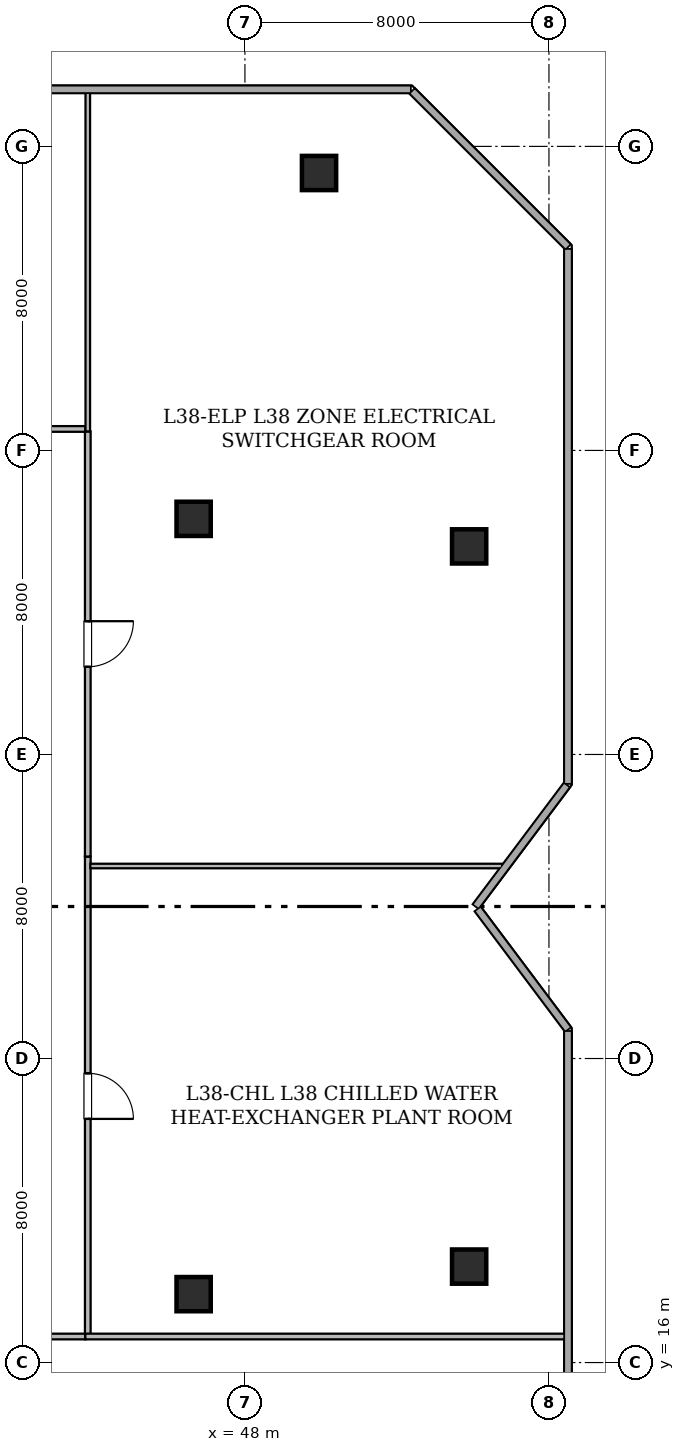
"""IFC4 building model, lengths in metres.
Left out: names, types, materials, properties, quantities, classifications, styles, units other than length and angle.
Written with IfcOpenShell. Run it as: python <this file> out.ifc"""

import sys

from ifc_helpers import new_model, si_unit, direction, frame, frame_2d, origin, origin_2d, place, context, subcontext, project, spatial, rectangle, hollow_rectangle, extrude, element, fill, save


model = new_model("IFC4")
c1 = context("Model", 3, precision=1e-05, world=origin(), true_north=direction((0.0, 1.0)))
c2 = subcontext(c1, "Body", "Model", "MODEL_VIEW")
j1 = project(units=[si_unit("LENGTHUNIT", "METRE"), si_unit("PLANEANGLEUNIT", "RADIAN")], contexts=[c1])
p1 = place(None, origin())
s1 = spatial("IfcSite", under=j1, at=p1, CompositionType="ELEMENT")
p2 = place(p1, origin())
s2 = spatial("IfcBuilding", under=s1, at=p2, CompositionType="ELEMENT")
p3 = place(p2, frame((0.0, 0.0, 150.5)))
s3 = spatial("IfcBuildingStorey", under=s2, at=p3, CompositionType="ELEMENT", Elevation=150.5)
for number, where, z_axis, x_axis in (
    (1, (49.95, 47.3, 0.0), (0.0, 0.0, 1.0), (1.0, 0.0, 0.0)),
    (2, (53.9, 18.525, 0.0), (0.0, 0.0, 1.0), (1.0, 0.0, 0.0)),
    (3, (53.9, 37.475, 0.0), (0.0, 0.0, 1.0), (1.0, 0.0, 0.0)),
    (4, (46.65, 17.8, 0.0), (0.0, 0.0, 1.0), (1.0, 0.0, 0.0)),
    (5, (46.65, 38.2, 0.0), (0.0, 0.0, 1.0), (1.0, 0.0, 0.0)),
):
    element("IfcColumn", number, at=place(p3, frame(where, z_axis=z_axis, x_axis=x_axis)), inside=s3, PredefinedType="COLUMN", context=c2, shape_type="SweptSolid", body=[
        extrude(hollow_rectangle(XDim=0.9, YDim=0.9, WallThickness=0.045, at=origin_2d()), origin(), (0.0, 0.0, 1.0), 5.375),
    ])
p4 = place(p3, frame((13.702, 49.5, 0.0), z_axis=(0.0, 0.0, 1.0), x_axis=(1.0, 0.0, 0.0)))
e6 = element("IfcWall", 6, at=p4, inside=s3, PredefinedType="STANDARD", context=c2, shape_type="SweptSolid", body=[
    extrude(rectangle(XDim=38.657, YDim=0.2, at=frame_2d((19.329, 0.0))), origin(), (0.0, 0.0, 1.0), 1.15),
])
p5 = place(p3, frame((52.404, 49.455, 0.0), z_axis=(0.0, 0.0, 1.0), x_axis=(0.707085707805, -0.70712785394, 0.0)))
e7 = element("IfcWall", 7, at=p5, inside=s3, PredefinedType="STANDARD", context=c2, shape_type="SweptSolid", body=[
    extrude(rectangle(XDim=5.793, YDim=0.2, at=frame_2d((2.896, 0.0))), origin(), (0.0, 0.0, 1.0), 1.15),
])
p6 = place(p3, frame((56.5, 45.296, 0.0), z_axis=(0.0, 0.0, 1.0), x_axis=(0.0, -1.0, 0.0)))
e8 = element("IfcWall", 8, at=p6, inside=s3, PredefinedType="STANDARD", context=c2, shape_type="SweptSolid", body=[
    extrude(rectangle(XDim=14.063, YDim=0.2, at=frame_2d((7.031, 0.0))), origin(), (0.0, 0.0, 1.0), 1.15),
])
p7 = place(p3, frame((56.469, 31.191, 0.0), z_axis=(0.0, 0.0, 1.0), x_axis=(-0.600137081448, -0.799897170561, 0.0)))
e9 = element("IfcWall", 9, at=p7, inside=s3, PredefinedType="STANDARD", context=c2, shape_type="SweptSolid", body=[
    extrude(rectangle(XDim=3.989, YDim=0.2, at=frame_2d((1.995, 0.0))), origin(), (0.0, 0.0, 1.0), 1.15),
])
p8 = place(p3, frame((54.127, 27.931, 0.0), z_axis=(0.0, 0.0, 1.0), x_axis=(0.600029630681, -0.799977776132, 0.0)))
e10 = element("IfcWall", 10, at=p8, inside=s3, PredefinedType="STANDARD", context=c2, shape_type="SweptSolid", body=[
    extrude(rectangle(XDim=3.955, YDim=0.2, at=frame_2d((1.978, 0.0))), origin(), (0.0, 0.0, 1.0), 1.15),
])
p9 = place(p3, frame((56.5, 24.717, 0.0), z_axis=(0.0, 0.0, 1.0), x_axis=(0.0, -1.0, 0.0)))
e11 = element("IfcWall", 11, at=p9, inside=s3, PredefinedType="STANDARD", context=c2, shape_type="SweptSolid", body=[
    extrude(rectangle(XDim=14.076, YDim=0.2, at=frame_2d((7.038, 0.0))), origin(), (0.0, 0.0, 1.0), 1.15),
])
p10 = place(p3, frame((43.8, 16.685, 0.0), z_axis=(0.0, 0.0, 1.0), x_axis=(-1.0, 0.0, 0.0)))
e12 = element("IfcWall", 12, at=p10, inside=s3, PredefinedType="STANDARD", context=c2, shape_type="SweptSolid", body=[
    extrude(rectangle(XDim=18.7, YDim=0.15, at=frame_2d((9.35, 0.0))), origin(), (0.0, 0.0, 1.0), 3.42),
])
p11 = place(p10, frame((8.75, 0.0, 0.0)))
e13 = element("IfcOpeningElement", 13, at=p11, cuts=e12, PredefinedType="OPENING", context=c2, shape_type="SweptSolid", body=[
    extrude(rectangle(XDim=1.2, YDim=2.15, at=frame_2d((0.6, 1.075))), frame((0.0, 0.085, 0.0), z_axis=(0.0, -1.0, 0.0), x_axis=(1.0, 0.0, 0.0)), (0.0, 0.0, 1.0), 0.17),
])
p12 = place(p3, frame((43.865, 29.314, 0.0), z_axis=(0.0, 0.0, 1.0), x_axis=(0.0, -1.0, 0.0)))
e14 = element("IfcWall", 14, at=p12, inside=s3, PredefinedType="STANDARD", context=c2, shape_type="SweptSolid", body=[
    extrude(rectangle(XDim=12.564, YDim=0.15, at=frame_2d((6.282, 0.0))), origin(), (0.0, 0.0, 1.0), 3.42),
])
p13 = place(p12, frame((5.703, 0.0, 0.0)))
e15 = element("IfcOpeningElement", 15, at=p13, cuts=e14, PredefinedType="OPENING", context=c2, shape_type="SweptSolid", body=[
    extrude(rectangle(XDim=1.2, YDim=2.15, at=frame_2d((0.6, 1.075))), frame((0.0, 0.085, 0.0), z_axis=(0.0, -1.0, 0.0), x_axis=(1.0, 0.0, 0.0)), (0.0, 0.0, 1.0), 0.17),
])
p14 = place(p3, frame((43.865, 40.5, 0.0), z_axis=(0.0, 0.0, 1.0), x_axis=(0.0, -1.0, 0.0)))
e16 = element("IfcWall", 16, at=p14, inside=s3, PredefinedType="STANDARD", context=c2, shape_type="SweptSolid", body=[
    extrude(rectangle(XDim=11.186, YDim=0.15, at=frame_2d((5.593, 0.0))), origin(), (0.0, 0.0, 1.0), 3.42),
])
p15 = place(p14, frame((4.993, 0.0, 0.0)))
e17 = element("IfcOpeningElement", 17, at=p15, cuts=e16, PredefinedType="OPENING", context=c2, shape_type="SweptSolid", body=[
    extrude(rectangle(XDim=1.2, YDim=2.15, at=frame_2d((0.6, 1.075))), frame((0.0, 0.085, 0.0), z_axis=(0.0, -1.0, 0.0), x_axis=(1.0, 0.0, 0.0)), (0.0, 0.0, 1.0), 0.17),
])
p16 = place(p3, frame((25.1, 40.565, 0.0), z_axis=(0.0, 0.0, 1.0), x_axis=(1.0, 0.0, 0.0)))
e18 = element("IfcWall", 18, at=p16, inside=s3, PredefinedType="STANDARD", context=c2, shape_type="SweptSolid", body=[
    extrude(rectangle(XDim=18.7, YDim=0.15, at=frame_2d((9.35, 0.0))), origin(), (0.0, 0.0, 1.0), 3.42),
])
p17 = place(p16, frame((8.75, 0.0, 0.0)))
e19 = element("IfcOpeningElement", 19, at=p17, cuts=e18, PredefinedType="OPENING", context=c2, shape_type="SweptSolid", body=[
    extrude(rectangle(XDim=1.2, YDim=2.15, at=frame_2d((0.6, 1.075))), frame((0.0, 0.085, 0.0), z_axis=(0.0, -1.0, 0.0), x_axis=(1.0, 0.0, 0.0)), (0.0, 0.0, 1.0), 0.17),
])
p18 = place(p3, frame((43.8, 16.685, 0.0), z_axis=(0.0, 0.0, 1.0), x_axis=(1.0, 0.0, 0.0)))
e20 = element("IfcWall", 20, at=p18, inside=s3, PredefinedType="STANDARD", context=c2, shape_type="SweptSolid", body=[
    extrude(rectangle(XDim=12.608, YDim=0.15, at=frame_2d((6.304, 0.0))), origin(), (0.0, 0.0, 1.0), 3.42),
])
p19 = place(p3, frame((43.932, 29.065, 0.0), z_axis=(0.0, 0.0, 1.0), x_axis=(1.0, 0.0, 0.0)))
e21 = element("IfcWall", 21, at=p19, inside=s3, PredefinedType="PARTITIONING", context=c2, shape_type="SweptSolid", body=[
    extrude(rectangle(XDim=10.838, YDim=0.12, at=frame_2d((5.419, 0.0))), origin(), (0.0, 0.0, 1.0), 3.42),
])
p20 = place(p3, frame((43.865, 40.5, 0.0), z_axis=(0.0, 0.0, 1.0), x_axis=(0.0, 1.0, 0.0)))
e22 = element("IfcWall", 22, at=p20, inside=s3, PredefinedType="PARTITIONING", context=c2, shape_type="SweptSolid", body=[
    extrude(rectangle(XDim=8.908, YDim=0.12, at=frame_2d((4.454, 0.0))), origin(), (0.0, 0.0, 1.0), 3.42),
])
p21 = place(p13, origin())
e23 = element("IfcDoor", 23, at=p21, inside=s3, OperationType="SINGLE_SWING_RIGHT", PredefinedType="DOOR", context=c2, shape_type="SweptSolid", body=[
    extrude(rectangle(XDim=1.2, YDim=2.15, at=frame_2d((0.6, 1.075))), frame((0.0, 0.025, 0.0), z_axis=(0.0, -1.0, 0.0), x_axis=(1.0, 0.0, 0.0)), (0.0, 0.0, 1.0), 0.05),
])
fill(e15, e23)
p22 = place(p15, origin())
e24 = element("IfcDoor", 24, at=p22, inside=s3, OperationType="SINGLE_SWING_LEFT", PredefinedType="DOOR", context=c2, shape_type="SweptSolid", body=[
    extrude(rectangle(XDim=1.2, YDim=2.15, at=frame_2d((0.6, 1.075))), frame((0.0, 0.025, 0.0), z_axis=(0.0, -1.0, 0.0), x_axis=(1.0, 0.0, 0.0)), (0.0, 0.0, 1.0), 0.05),
])
fill(e17, e24)
save(model, sys.argv[1])
